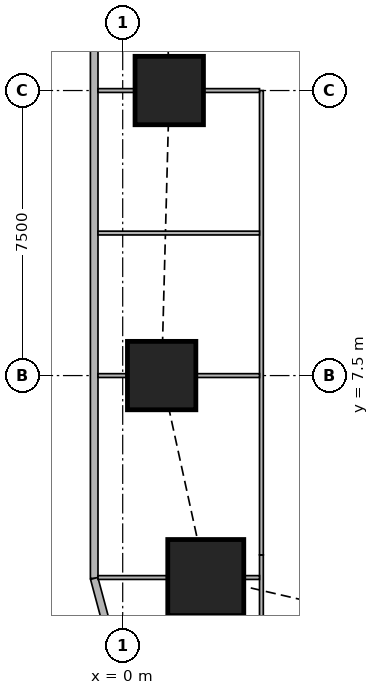
"""IFC4 building model, lengths in metres.
Left out: names, types, materials, properties, quantities, classifications, styles, units other than length and angle.
Written with IfcOpenShell. Run it as: python <this file> out.ifc"""

import sys

from ifc_helpers import new_model, si_unit, direction, frame, frame_2d, origin, origin_2d, place, context, subcontext, project, spatial, rectangle, extrude, element, fill, save


model = new_model("IFC4")
c1 = context("Model", 3, precision=1e-05, world=origin(), true_north=direction((0.0, 1.0)))
c2 = subcontext(c1, "Body", "Model", "MODEL_VIEW")
j1 = project(units=[si_unit("LENGTHUNIT", "METRE"), si_unit("PLANEANGLEUNIT", "RADIAN")], contexts=[c1])
p1 = place(None, origin())
s1 = spatial("IfcSite", under=j1, at=p1, CompositionType="ELEMENT")
p2 = place(p1, origin())
s2 = spatial("IfcBuilding", under=s1, at=p2, CompositionType="ELEMENT")
p3 = place(p2, frame((0.0, 0.0, 147.05)))
s3 = spatial("IfcBuildingStorey", under=s2, at=p3, CompositionType="ELEMENT", Elevation=147.05)
p4 = place(p3, frame((2.186, 2.186, 0.0), z_axis=(0.0, 0.0, 1.0), x_axis=(1.0, 0.0, 0.0)))
e1 = element("IfcColumn", 1, at=p4, inside=s3, PredefinedType="COLUMN", context=c2, shape_type="SweptSolid", body=[
    extrude(rectangle(XDim=2.0, YDim=2.0, at=origin_2d()), origin(), (0.0, 0.0, 1.0), 3.75),
])
for number, where, z_axis, x_axis in (
    (2, (1.025, 7.5, 0.0), (0.0, 0.0, 1.0), (1.0, 0.0, 0.0)),
    (3, (1.225, 15.0, 0.0), (0.0, 0.0, 1.0), (1.0, 0.0, 0.0)),
):
    element("IfcColumn", number, at=place(p3, frame(where, z_axis=z_axis, x_axis=x_axis)), inside=s3, PredefinedType="COLUMN", context=c2, shape_type="SweptSolid", body=[
        extrude(rectangle(XDim=1.8, YDim=1.8, at=origin_2d()), origin(), (0.0, 0.0, 1.0), 3.75),
    ])
p5 = place(p3, frame((-0.75, 42.837, 0.0), z_axis=(0.0, 0.0, 1.0), x_axis=(0.0, -1.0, 0.0)))
e4 = element("IfcWall", 4, at=p5, inside=s3, PredefinedType="SOLIDWALL", context=c2, shape_type="SweptSolid", body=[
    extrude(rectangle(XDim=40.674, YDim=0.2, at=frame_2d((20.337, 0.0))), origin(), (0.0, 0.0, 1.0), 3.5),
])
p6 = place(p5, frame((1.78, 0.0, 0.9)))
e5 = element("IfcOpeningElement", 5, at=p6, cuts=e4, PredefinedType="OPENING", context=c2, shape_type="SweptSolid", body=[
    extrude(rectangle(XDim=1.8, YDim=1.5, at=frame_2d((0.9, 0.75))), frame((0.0, 0.11, 0.0), z_axis=(0.0, -1.0, 0.0), x_axis=(1.0, 0.0, 0.0)), (0.0, 0.0, 1.0), 0.22),
])
p7 = place(p5, frame((6.312, 0.0, 0.9)))
e6 = element("IfcOpeningElement", 6, at=p7, cuts=e4, PredefinedType="OPENING", context=c2, shape_type="SweptSolid", body=[
    extrude(rectangle(XDim=1.8, YDim=1.5, at=frame_2d((0.9, 0.75))), frame((0.0, 0.11, 0.0), z_axis=(0.0, -1.0, 0.0), x_axis=(1.0, 0.0, 0.0)), (0.0, 0.0, 1.0), 0.22),
])
p8 = place(p5, frame((10.062, 0.0, 0.9)))
e7 = element("IfcOpeningElement", 7, at=p8, cuts=e4, PredefinedType="OPENING", context=c2, shape_type="SweptSolid", body=[
    extrude(rectangle(XDim=1.8, YDim=1.5, at=frame_2d((0.9, 0.75))), frame((0.0, 0.11, 0.0), z_axis=(0.0, -1.0, 0.0), x_axis=(1.0, 0.0, 0.0)), (0.0, 0.0, 1.0), 0.22),
])
p9 = place(p5, frame((13.812, 0.0, 0.9)))
e8 = element("IfcOpeningElement", 8, at=p9, cuts=e4, PredefinedType="OPENING", context=c2, shape_type="SweptSolid", body=[
    extrude(rectangle(XDim=1.8, YDim=1.5, at=frame_2d((0.9, 0.75))), frame((0.0, 0.11, 0.0), z_axis=(0.0, -1.0, 0.0), x_axis=(1.0, 0.0, 0.0)), (0.0, 0.0, 1.0), 0.22),
])
p10 = place(p5, frame((17.562, 0.0, 0.9)))
e9 = element("IfcOpeningElement", 9, at=p10, cuts=e4, PredefinedType="OPENING", context=c2, shape_type="SweptSolid", body=[
    extrude(rectangle(XDim=1.8, YDim=1.5, at=frame_2d((0.9, 0.75))), frame((0.0, 0.11, 0.0), z_axis=(0.0, -1.0, 0.0), x_axis=(1.0, 0.0, 0.0)), (0.0, 0.0, 1.0), 0.22),
])
p11 = place(p5, frame((21.312, 0.0, 0.9)))
e10 = element("IfcOpeningElement", 10, at=p11, cuts=e4, PredefinedType="OPENING", context=c2, shape_type="SweptSolid", body=[
    extrude(rectangle(XDim=1.8, YDim=1.5, at=frame_2d((0.9, 0.75))), frame((0.0, 0.11, 0.0), z_axis=(0.0, -1.0, 0.0), x_axis=(1.0, 0.0, 0.0)), (0.0, 0.0, 1.0), 0.22),
])
p12 = place(p5, frame((25.062, 0.0, 0.9)))
e11 = element("IfcOpeningElement", 11, at=p12, cuts=e4, PredefinedType="OPENING", context=c2, shape_type="SweptSolid", body=[
    extrude(rectangle(XDim=1.8, YDim=1.5, at=frame_2d((0.9, 0.75))), frame((0.0, 0.11, 0.0), z_axis=(0.0, -1.0, 0.0), x_axis=(1.0, 0.0, 0.0)), (0.0, 0.0, 1.0), 0.22),
])
p13 = place(p5, frame((28.812, 0.0, 0.9)))
e12 = element("IfcOpeningElement", 12, at=p13, cuts=e4, PredefinedType="OPENING", context=c2, shape_type="SweptSolid", body=[
    extrude(rectangle(XDim=1.8, YDim=1.5, at=frame_2d((0.9, 0.75))), frame((0.0, 0.11, 0.0), z_axis=(0.0, -1.0, 0.0), x_axis=(1.0, 0.0, 0.0)), (0.0, 0.0, 1.0), 0.22),
])
p14 = place(p5, frame((32.562, 0.0, 0.9)))
e13 = element("IfcOpeningElement", 13, at=p14, cuts=e4, PredefinedType="OPENING", context=c2, shape_type="SweptSolid", body=[
    extrude(rectangle(XDim=1.8, YDim=1.5, at=frame_2d((0.9, 0.75))), frame((0.0, 0.11, 0.0), z_axis=(0.0, -1.0, 0.0), x_axis=(1.0, 0.0, 0.0)), (0.0, 0.0, 1.0), 0.22),
])
p15 = place(p5, frame((37.094, 0.0, 0.9)))
e14 = element("IfcOpeningElement", 14, at=p15, cuts=e4, PredefinedType="OPENING", context=c2, shape_type="SweptSolid", body=[
    extrude(rectangle(XDim=1.8, YDim=1.5, at=frame_2d((0.9, 0.75))), frame((0.0, 0.11, 0.0), z_axis=(0.0, -1.0, 0.0), x_axis=(1.0, 0.0, 0.0)), (0.0, 0.0, 1.0), 0.22),
])
p16 = place(p3, frame((-0.75, 2.163, 0.0), z_axis=(0.0, 0.0, 1.0), x_axis=(0.259168954497, -0.965832000415, 0.0)))
e15 = element("IfcWall", 15, at=p16, inside=s3, PredefinedType="SOLIDWALL", context=c2, shape_type="SweptSolid", body=[
    extrude(rectangle(XDim=1.513, YDim=0.2, at=frame_2d((0.756, 0.0))), origin(), (0.0, 0.0, 1.0), 3.5),
])
p17 = place(p3, frame((3.65, 0.912, 0.0), z_axis=(0.0, 0.0, 1.0), x_axis=(0.0, 1.0, 0.0)))
e16 = element("IfcWall", 16, at=p17, inside=s3, PredefinedType="PARTITIONING", context=c2, shape_type="SweptSolid", body=[
    extrude(rectangle(XDim=1.87, YDim=0.1, at=frame_2d((0.935, 0.0))), origin(), (0.0, 0.0, 1.0), 2.1),
])
p18 = place(p3, frame((3.65, 2.782, 0.0), z_axis=(0.0, 0.0, 1.0), x_axis=(0.0, 1.0, 0.0)))
e17 = element("IfcWall", 17, at=p18, inside=s3, PredefinedType="PARTITIONING", context=c2, shape_type="SweptSolid", body=[
    extrude(rectangle(XDim=12.218, YDim=0.1, at=frame_2d((6.109, 0.0))), origin(), (0.0, 0.0, 1.0), 3.5),
])
p19 = place(p18, frame((11.118, 0.0, 0.0)))
e18 = element("IfcOpeningElement", 18, at=p19, cuts=e17, PredefinedType="OPENING", context=c2, shape_type="SweptSolid", body=[
    extrude(rectangle(XDim=0.9, YDim=2.1, at=frame_2d((0.45, 1.05))), frame((0.0, 0.06, 0.0), z_axis=(0.0, -1.0, 0.0), x_axis=(1.0, 0.0, 0.0)), (0.0, 0.0, 1.0), 0.12),
])
p20 = place(p18, frame((7.368, 0.0, 0.0)))
e19 = element("IfcOpeningElement", 19, at=p20, cuts=e17, PredefinedType="OPENING", context=c2, shape_type="SweptSolid", body=[
    extrude(rectangle(XDim=0.9, YDim=2.1, at=frame_2d((0.45, 1.05))), frame((0.0, 0.06, 0.0), z_axis=(0.0, -1.0, 0.0), x_axis=(1.0, 0.0, 0.0)), (0.0, 0.0, 1.0), 0.12),
])
p21 = place(p18, frame((3.618, 0.0, 0.0)))
e20 = element("IfcOpeningElement", 20, at=p21, cuts=e17, PredefinedType="OPENING", context=c2, shape_type="SweptSolid", body=[
    extrude(rectangle(XDim=0.9, YDim=2.1, at=frame_2d((0.45, 1.05))), frame((0.0, 0.06, 0.0), z_axis=(0.0, -1.0, 0.0), x_axis=(1.0, 0.0, 0.0)), (0.0, 0.0, 1.0), 0.12),
])
p22 = place(p3, frame((-0.65, 2.186, 0.0), z_axis=(0.0, 0.0, 1.0), x_axis=(1.0, 0.0, 0.0)))
e21 = element("IfcWall", 21, at=p22, inside=s3, PredefinedType="PARTITIONING", context=c2, shape_type="SweptSolid", body=[
    extrude(rectangle(XDim=1.835, YDim=0.1, at=frame_2d((0.917, 0.0))), origin(), (0.0, 0.0, 1.0), 3.5),
])
p23 = place(p3, frame((3.187, 2.186, 0.0), z_axis=(0.0, 0.0, 1.0), x_axis=(1.0, 0.0, 0.0)))
e22 = element("IfcWall", 22, at=p23, inside=s3, PredefinedType="PARTITIONING", context=c2, shape_type="SweptSolid", body=[
    extrude(rectangle(XDim=0.413, YDim=0.1, at=frame_2d((0.207, 0.0))), origin(), (0.0, 0.0, 1.0), 2.1),
])
p24 = place(p3, frame((-0.65, 7.5, 0.0), z_axis=(0.0, 0.0, 1.0), x_axis=(1.0, 0.0, 0.0)))
e23 = element("IfcWall", 23, at=p24, inside=s3, PredefinedType="PARTITIONING", context=c2, shape_type="SweptSolid", body=[
    extrude(rectangle(XDim=0.774, YDim=0.1, at=frame_2d((0.387, 0.0))), origin(), (0.0, 0.0, 1.0), 3.5),
])
p25 = place(p3, frame((1.926, 7.5, 0.0), z_axis=(0.0, 0.0, 1.0), x_axis=(1.0, 0.0, 0.0)))
e24 = element("IfcWall", 24, at=p25, inside=s3, PredefinedType="PARTITIONING", context=c2, shape_type="SweptSolid", body=[
    extrude(rectangle(XDim=1.674, YDim=0.1, at=frame_2d((0.837, 0.0))), origin(), (0.0, 0.0, 1.0), 2.1),
])
p26 = place(p3, frame((-0.65, 11.25, 0.0), z_axis=(0.0, 0.0, 1.0), x_axis=(1.0, 0.0, 0.0)))
e25 = element("IfcWall", 25, at=p26, inside=s3, PredefinedType="PARTITIONING", context=c2, shape_type="SweptSolid", body=[
    extrude(rectangle(XDim=4.25, YDim=0.1, at=frame_2d((2.125, 0.0))), origin(), (0.0, 0.0, 1.0), 2.1),
])
p27 = place(p3, frame((-0.65, 15.0, 0.0), z_axis=(0.0, 0.0, 1.0), x_axis=(1.0, 0.0, 0.0)))
e26 = element("IfcWall", 26, at=p27, inside=s3, PredefinedType="PARTITIONING", context=c2, shape_type="SweptSolid", body=[
    extrude(rectangle(XDim=0.974, YDim=0.1, at=frame_2d((0.487, 0.0))), origin(), (0.0, 0.0, 1.0), 3.5),
])
p28 = place(p3, frame((2.126, 15.0, 0.0), z_axis=(0.0, 0.0, 1.0), x_axis=(1.0, 0.0, 0.0)))
e27 = element("IfcWall", 27, at=p28, inside=s3, PredefinedType="PARTITIONING", context=c2, shape_type="SweptSolid", body=[
    extrude(rectangle(XDim=1.474, YDim=0.1, at=frame_2d((0.737, 0.0))), origin(), (0.0, 0.0, 1.0), 3.5),
])
p29 = place(p12, origin())
e28 = element("IfcWindow", 28, at=p29, inside=s3, PartitioningType="SINGLE_PANEL", PredefinedType="WINDOW", context=c2, shape_type="SweptSolid", body=[
    extrude(rectangle(XDim=1.8, YDim=1.5, at=frame_2d((0.9, 0.75))), frame((0.0, 0.03, 0.0), z_axis=(0.0, -1.0, 0.0), x_axis=(1.0, 0.0, 0.0)), (0.0, 0.0, 1.0), 0.06),
])
fill(e11, e28)
p30 = place(p13, origin())
e29 = element("IfcWindow", 29, at=p30, inside=s3, PartitioningType="SINGLE_PANEL", PredefinedType="WINDOW", context=c2, shape_type="SweptSolid", body=[
    extrude(rectangle(XDim=1.8, YDim=1.5, at=frame_2d((0.9, 0.75))), frame((0.0, 0.03, 0.0), z_axis=(0.0, -1.0, 0.0), x_axis=(1.0, 0.0, 0.0)), (0.0, 0.0, 1.0), 0.06),
])
fill(e12, e29)
p31 = place(p14, origin())
e30 = element("IfcWindow", 30, at=p31, inside=s3, PartitioningType="SINGLE_PANEL", PredefinedType="WINDOW", context=c2, shape_type="SweptSolid", body=[
    extrude(rectangle(XDim=1.8, YDim=1.5, at=frame_2d((0.9, 0.75))), frame((0.0, 0.03, 0.0), z_axis=(0.0, -1.0, 0.0), x_axis=(1.0, 0.0, 0.0)), (0.0, 0.0, 1.0), 0.06),
])
fill(e13, e30)
p32 = place(p15, origin())
e31 = element("IfcWindow", 31, at=p32, inside=s3, PartitioningType="SINGLE_PANEL", PredefinedType="WINDOW", context=c2, shape_type="SweptSolid", body=[
    extrude(rectangle(XDim=1.8, YDim=1.5, at=frame_2d((0.9, 0.75))), frame((0.0, 0.03, 0.0), z_axis=(0.0, -1.0, 0.0), x_axis=(1.0, 0.0, 0.0)), (0.0, 0.0, 1.0), 0.06),
])
fill(e14, e31)
p33 = place(p19, origin())
e32 = element("IfcDoor", 32, at=p33, inside=s3, OperationType="SINGLE_SWING_RIGHT", PredefinedType="DOOR", context=c2, shape_type="SweptSolid", body=[
    extrude(rectangle(XDim=0.9, YDim=2.1, at=frame_2d((0.45, 1.05))), frame((0.0, 0.025, 0.0), z_axis=(0.0, -1.0, 0.0), x_axis=(1.0, 0.0, 0.0)), (0.0, 0.0, 1.0), 0.05),
])
fill(e18, e32)
p34 = place(p20, origin())
e33 = element("IfcDoor", 33, at=p34, inside=s3, OperationType="SINGLE_SWING_RIGHT", PredefinedType="DOOR", context=c2, shape_type="SweptSolid", body=[
    extrude(rectangle(XDim=0.9, YDim=2.1, at=frame_2d((0.45, 1.05))), frame((0.0, 0.025, 0.0), z_axis=(0.0, -1.0, 0.0), x_axis=(1.0, 0.0, 0.0)), (0.0, 0.0, 1.0), 0.05),
])
fill(e19, e33)
p35 = place(p21, origin())
e34 = element("IfcDoor", 34, at=p35, inside=s3, OperationType="SINGLE_SWING_RIGHT", PredefinedType="DOOR", context=c2, shape_type="SweptSolid", body=[
    extrude(rectangle(XDim=0.9, YDim=2.1, at=frame_2d((0.45, 1.05))), frame((0.0, 0.025, 0.0), z_axis=(0.0, -1.0, 0.0), x_axis=(1.0, 0.0, 0.0)), (0.0, 0.0, 1.0), 0.05),
])
fill(e20, e34)
save(model, sys.argv[1])
